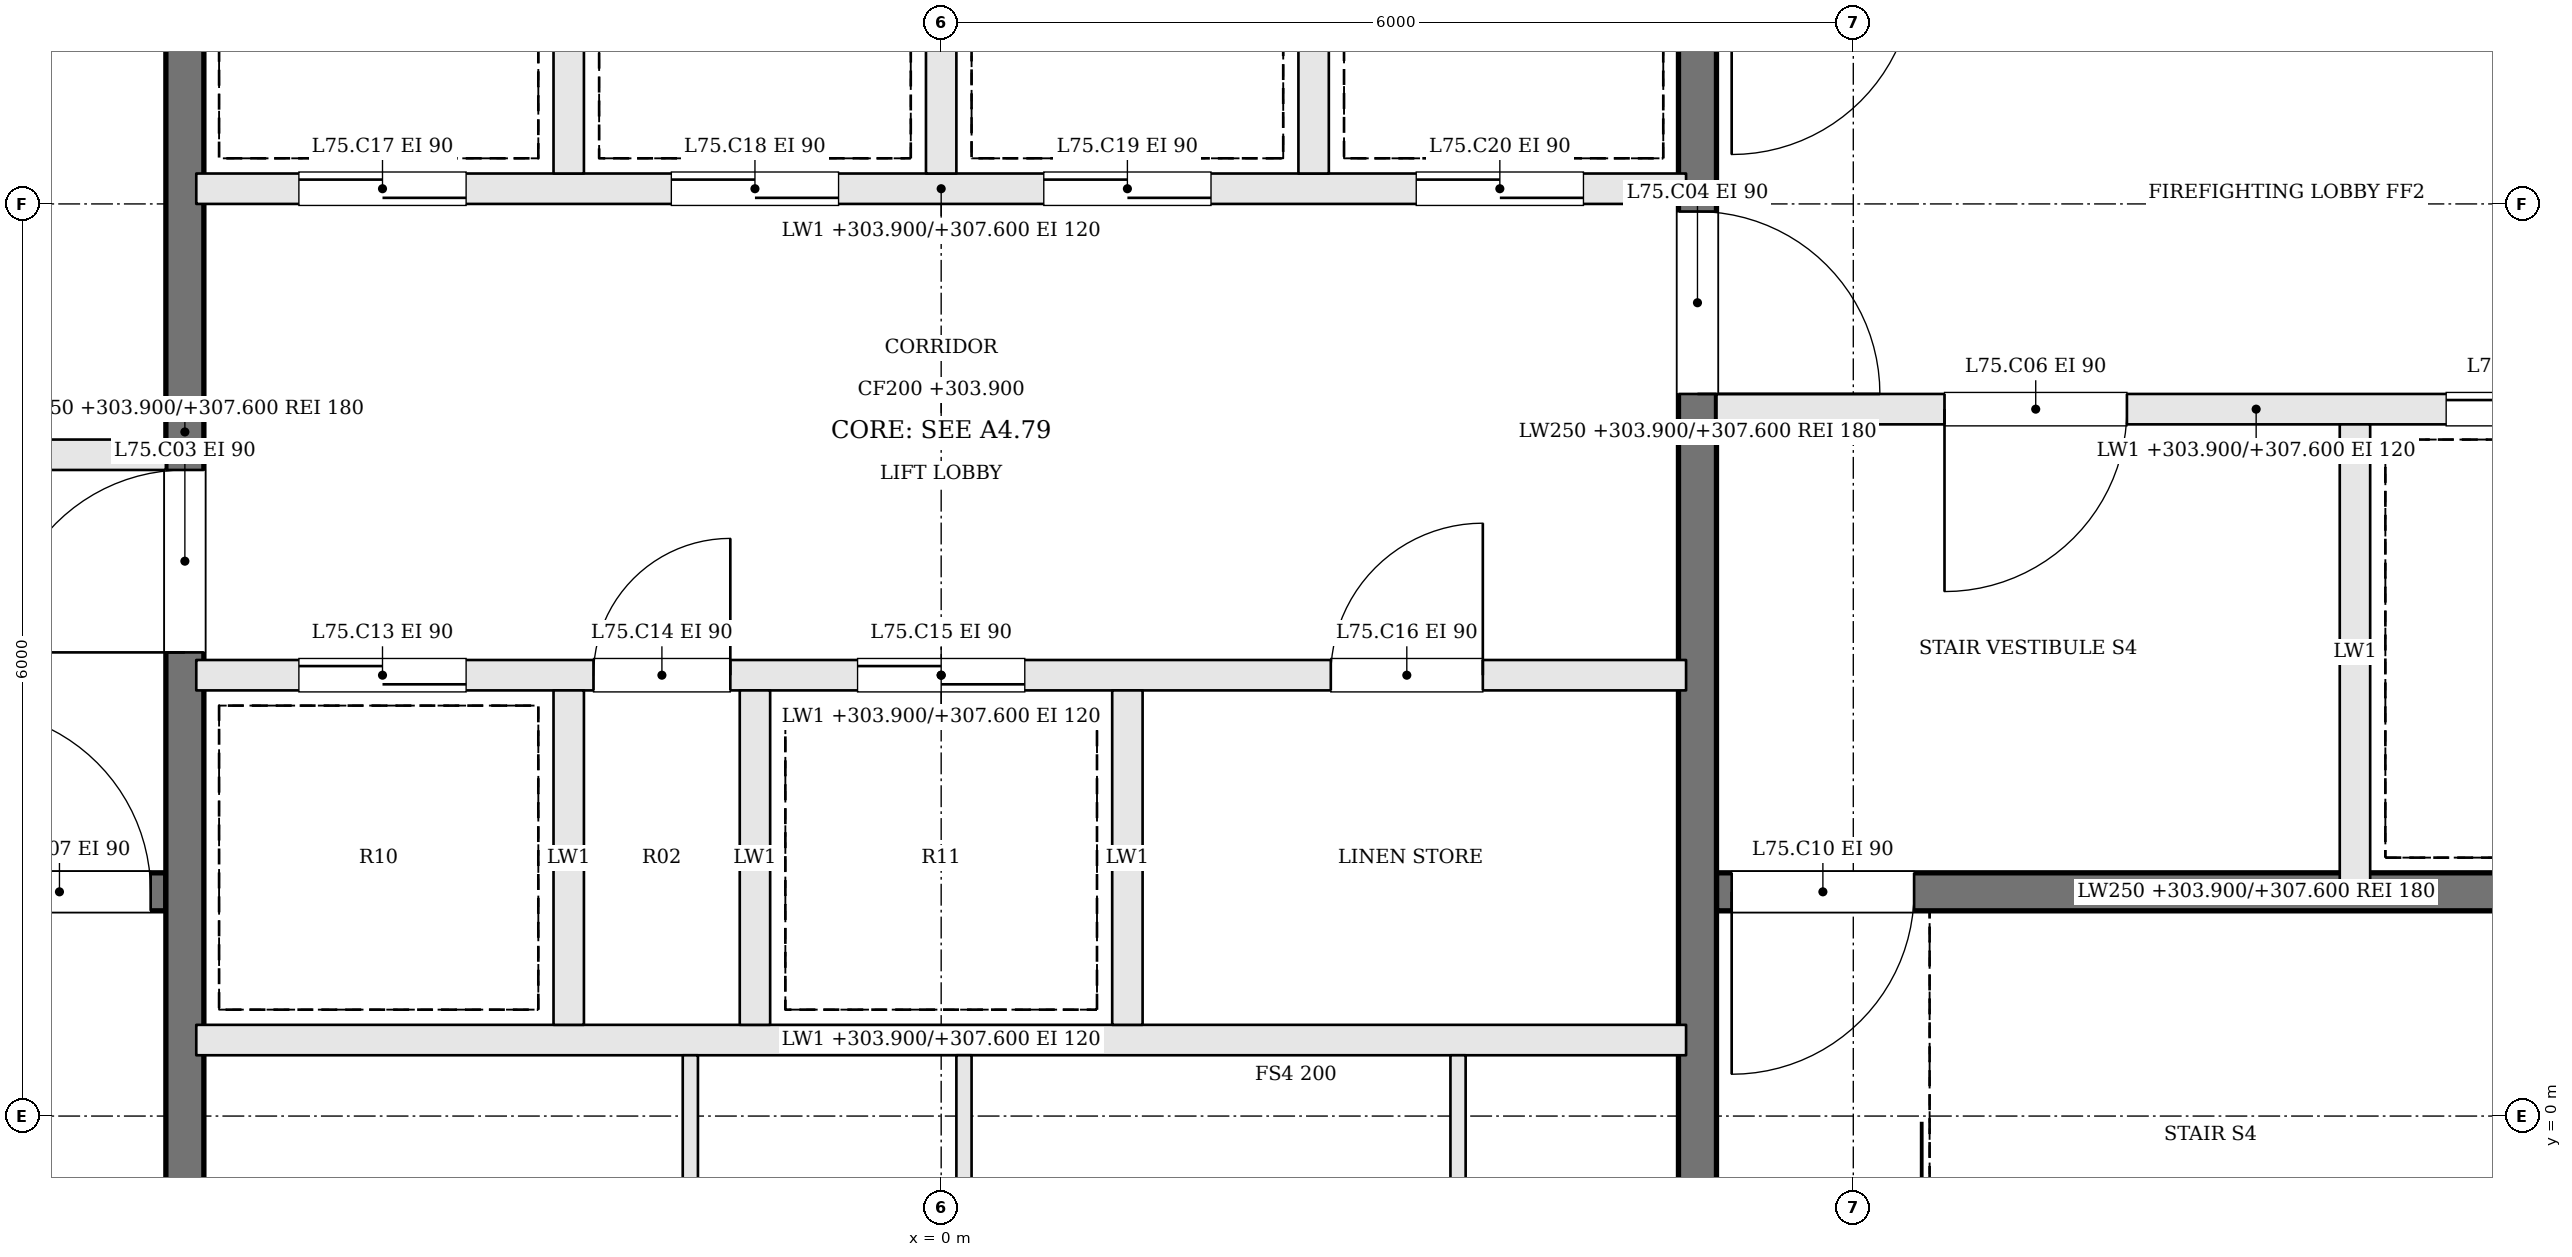
"""IFC4 building model, lengths in metres.
Left out: names, types, materials, properties, quantities, classifications, styles, units other than length and angle.
Written with IfcOpenShell. Run it as: python <this file> out.ifc"""

import sys

from ifc_helpers import new_model, si_unit, direction, frame, frame_2d, origin, place, context, subcontext, project, spatial, rectangle, extrude, element, fill, save


model = new_model("IFC4")
c1 = context("Model", 3, precision=1e-05, world=origin(), true_north=direction((0.0, 1.0)))
c2 = subcontext(c1, "Body", "Model", "MODEL_VIEW")
j1 = project(units=[si_unit("LENGTHUNIT", "METRE"), si_unit("PLANEANGLEUNIT", "RADIAN")], contexts=[c1])
p1 = place(None, origin())
s1 = spatial("IfcSite", under=j1, at=p1, CompositionType="ELEMENT")
p2 = place(p1, origin())
s2 = spatial("IfcBuilding", under=s1, at=p2, CompositionType="ELEMENT")
p3 = place(p2, frame((0.0, 0.0, 303.9)))
s3 = spatial("IfcBuildingStorey", under=s2, at=p3, CompositionType="ELEMENT", Elevation=303.9)
p4 = place(p3, frame((-12.2, 1.475, 0.0), z_axis=(0.0, 0.0, 1.0), x_axis=(1.0, 0.0, 0.0)))
e1 = element("IfcWall", 1, at=p4, inside=s3, PredefinedType="SOLIDWALL", context=c2, shape_type="SweptSolid", body=[
    extrude(rectangle(XDim=7.1, YDim=0.25, at=frame_2d((3.55, 0.0))), origin(), (0.0, 0.0, 1.0), 3.7),
])
p5 = place(p4, frame((5.8, 0.0, 0.0)))
e2 = element("IfcOpeningElement", 2, at=p5, cuts=e1, PredefinedType="OPENING", context=c2, shape_type="SweptSolid", body=[
    extrude(rectangle(XDim=1.2, YDim=2.1, at=frame_2d((0.6, 1.05))), frame((0.0, 0.135, 0.0), z_axis=(0.0, -1.0, 0.0), x_axis=(1.0, 0.0, 0.0)), (0.0, 0.0, 1.0), 0.27),
])
p6 = place(p3, frame((-12.2, 4.35, 0.0), z_axis=(0.0, 0.0, 1.0), x_axis=(1.0, 0.0, 0.0)))
e3 = element("IfcWall", 3, at=p6, inside=s3, PredefinedType="SOLIDWALL", context=c2, shape_type="SweptSolid", body=[
    extrude(rectangle(XDim=7.1, YDim=0.2, at=frame_2d((3.55, 0.0))), origin(), (0.0, 0.0, 1.0), 3.7),
])
p7 = place(p6, frame((4.4, 0.0, 0.0)))
e4 = element("IfcOpeningElement", 4, at=p7, cuts=e3, PredefinedType="OPENING", context=c2, shape_type="SweptSolid", body=[
    extrude(rectangle(XDim=1.2, YDim=2.1, at=frame_2d((0.6, 1.05))), frame((0.0, 0.11, 0.0), z_axis=(0.0, -1.0, 0.0), x_axis=(1.0, 0.0, 0.0)), (0.0, 0.0, 1.0), 0.22),
])
p8 = place(p6, frame((1.1, 0.0, 0.0)))
e5 = element("IfcOpeningElement", 5, at=p8, cuts=e3, PredefinedType="OPENING", context=c2, shape_type="SweptSolid", body=[
    extrude(rectangle(XDim=1.2, YDim=2.1, at=frame_2d((0.6, 1.05))), frame((0.0, 0.11, 0.0), z_axis=(0.0, -1.0, 0.0), x_axis=(1.0, 0.0, 0.0)), (0.0, 0.0, 1.0), 0.22),
])
p9 = place(p3, frame((12.2, 4.65, 0.0), z_axis=(0.0, 0.0, 1.0), x_axis=(-1.0, 0.0, 0.0)))
e6 = element("IfcWall", 6, at=p9, inside=s3, PredefinedType="SOLIDWALL", context=c2, shape_type="SweptSolid", body=[
    extrude(rectangle(XDim=7.1, YDim=0.2, at=frame_2d((3.55, 0.0))), origin(), (0.0, 0.0, 1.0), 3.7),
])
p10 = place(p9, frame((4.4, 0.0, 0.0)))
e7 = element("IfcOpeningElement", 7, at=p10, cuts=e6, PredefinedType="OPENING", context=c2, shape_type="SweptSolid", body=[
    extrude(rectangle(XDim=1.2, YDim=2.1, at=frame_2d((0.6, 1.05))), frame((0.0, 0.11, 0.0), z_axis=(0.0, -1.0, 0.0), x_axis=(1.0, 0.0, 0.0)), (0.0, 0.0, 1.0), 0.22),
])
p11 = place(p9, frame((1.1, 0.0, 0.0)))
e8 = element("IfcOpeningElement", 8, at=p11, cuts=e6, PredefinedType="OPENING", context=c2, shape_type="SweptSolid", body=[
    extrude(rectangle(XDim=1.2, YDim=2.1, at=frame_2d((0.6, 1.05))), frame((0.0, 0.11, 0.0), z_axis=(0.0, -1.0, 0.0), x_axis=(1.0, 0.0, 0.0)), (0.0, 0.0, 1.0), 0.22),
])
p12 = place(p3, frame((12.2, 1.475, 0.0), z_axis=(0.0, 0.0, 1.0), x_axis=(-1.0, 0.0, 0.0)))
e9 = element("IfcWall", 9, at=p12, inside=s3, PredefinedType="SOLIDWALL", context=c2, shape_type="SweptSolid", body=[
    extrude(rectangle(XDim=7.1, YDim=0.25, at=frame_2d((3.55, 0.0))), origin(), (0.0, 0.0, 1.0), 3.7),
])
p13 = place(p12, frame((5.8, 0.0, 0.0)))
e10 = element("IfcOpeningElement", 10, at=p13, cuts=e9, PredefinedType="OPENING", context=c2, shape_type="SweptSolid", body=[
    extrude(rectangle(XDim=1.2, YDim=2.1, at=frame_2d((0.6, 1.05))), frame((0.0, 0.135, 0.0), z_axis=(0.0, -1.0, 0.0), x_axis=(1.0, 0.0, 0.0)), (0.0, 0.0, 1.0), 0.27),
])
p14 = place(p3, frame((9.3, 4.55, 0.0), z_axis=(0.0, 0.0, 1.0), x_axis=(0.0, -1.0, 0.0)))
e11 = element("IfcWall", 11, at=p14, inside=s3, PredefinedType="SOLIDWALL", context=c2, shape_type="SweptSolid", body=[
    extrude(rectangle(XDim=3.0, YDim=0.2, at=frame_2d((1.5, 0.0))), origin(), (0.0, 0.0, 1.0), 3.7),
])
p15 = place(p3, frame((-4.975, -2.2, 0.0), z_axis=(0.0, 0.0, 1.0), x_axis=(0.0, 1.0, 0.0)))
e12 = element("IfcWall", 12, at=p15, inside=s3, PredefinedType="SOLIDWALL", context=c2, shape_type="SweptSolid", body=[
    extrude(rectangle(XDim=13.4, YDim=0.25, at=frame_2d((6.7, 0.0))), origin(), (0.0, 0.0, 1.0), 3.7),
])
p16 = place(p15, frame((5.25, 0.0, 0.0)))
e13 = element("IfcOpeningElement", 13, at=p16, cuts=e12, PredefinedType="OPENING", context=c2, shape_type="SweptSolid", body=[
    extrude(rectangle(XDim=1.2, YDim=2.1, at=frame_2d((0.6, 1.05))), frame((0.0, 0.135, 0.0), z_axis=(0.0, -1.0, 0.0), x_axis=(1.0, 0.0, 0.0)), (0.0, 0.0, 1.0), 0.27),
])
p17 = place(p3, frame((4.975, 11.2, 0.0), z_axis=(0.0, 0.0, 1.0), x_axis=(0.0, -1.0, 0.0)))
e14 = element("IfcWall", 14, at=p17, inside=s3, PredefinedType="SOLIDWALL", context=c2, shape_type="SweptSolid", body=[
    extrude(rectangle(XDim=13.4, YDim=0.25, at=frame_2d((6.7, 0.0))), origin(), (0.0, 0.0, 1.0), 3.7),
])
p18 = place(p17, frame((5.25, 0.0, 0.0)))
e15 = element("IfcOpeningElement", 15, at=p18, cuts=e14, PredefinedType="OPENING", context=c2, shape_type="SweptSolid", body=[
    extrude(rectangle(XDim=1.2, YDim=2.1, at=frame_2d((0.6, 1.05))), frame((0.0, 0.135, 0.0), z_axis=(0.0, -1.0, 0.0), x_axis=(1.0, 0.0, 0.0)), (0.0, 0.0, 1.0), 0.27),
])
p19 = place(p3, frame((-4.9, 0.5, 0.0), z_axis=(0.0, 0.0, 1.0), x_axis=(1.0, 0.0, 0.0)))
e16 = element("IfcWall", 16, at=p19, inside=s3, PredefinedType="SOLIDWALL", context=c2, shape_type="SweptSolid", body=[
    extrude(rectangle(XDim=9.8, YDim=0.2, at=frame_2d((4.9, 0.0))), origin(), (0.0, 0.0, 1.0), 3.7),
])
p20 = place(p3, frame((-4.9, 2.9, 0.0), z_axis=(0.0, 0.0, 1.0), x_axis=(1.0, 0.0, 0.0)))
e17 = element("IfcWall", 17, at=p20, inside=s3, PredefinedType="SOLIDWALL", context=c2, shape_type="SweptSolid", body=[
    extrude(rectangle(XDim=9.8, YDim=0.2, at=frame_2d((4.9, 0.0))), origin(), (0.0, 0.0, 1.0), 3.7),
])
p21 = place(p20, frame((0.675, 0.0, 0.0)))
e18 = element("IfcOpeningElement", 18, at=p21, cuts=e17, PredefinedType="OPENING", context=c2, shape_type="SweptSolid", body=[
    extrude(rectangle(XDim=1.1, YDim=2.1, at=frame_2d((0.55, 1.05))), frame((0.0, 0.11, 0.0), z_axis=(0.0, -1.0, 0.0), x_axis=(1.0, 0.0, 0.0)), (0.0, 0.0, 1.0), 0.22),
])
p22 = place(p20, frame((2.613, 0.0, 0.0)))
e19 = element("IfcOpeningElement", 19, at=p22, cuts=e17, PredefinedType="OPENING", context=c2, shape_type="SweptSolid", body=[
    extrude(rectangle(XDim=0.9, YDim=2.1, at=frame_2d((0.45, 1.05))), frame((0.0, 0.11, 0.0), z_axis=(0.0, -1.0, 0.0), x_axis=(1.0, 0.0, 0.0)), (0.0, 0.0, 1.0), 0.22),
])
p23 = place(p20, frame((4.35, 0.0, 0.0)))
e20 = element("IfcOpeningElement", 20, at=p23, cuts=e17, PredefinedType="OPENING", context=c2, shape_type="SweptSolid", body=[
    extrude(rectangle(XDim=1.1, YDim=2.1, at=frame_2d((0.55, 1.05))), frame((0.0, 0.11, 0.0), z_axis=(0.0, -1.0, 0.0), x_axis=(1.0, 0.0, 0.0)), (0.0, 0.0, 1.0), 0.22),
])
p24 = place(p20, frame((7.463, 0.0, 0.0)))
e21 = element("IfcOpeningElement", 21, at=p24, cuts=e17, PredefinedType="OPENING", context=c2, shape_type="SweptSolid", body=[
    extrude(rectangle(XDim=1.0, YDim=2.1, at=frame_2d((0.5, 1.05))), frame((0.0, 0.11, 0.0), z_axis=(0.0, -1.0, 0.0), x_axis=(1.0, 0.0, 0.0)), (0.0, 0.0, 1.0), 0.22),
])
p25 = place(p3, frame((-4.9, 6.1, 0.0), z_axis=(0.0, 0.0, 1.0), x_axis=(1.0, 0.0, 0.0)))
e22 = element("IfcWall", 22, at=p25, inside=s3, PredefinedType="SOLIDWALL", context=c2, shape_type="SweptSolid", body=[
    extrude(rectangle(XDim=9.8, YDim=0.2, at=frame_2d((4.9, 0.0))), origin(), (0.0, 0.0, 1.0), 3.7),
])
p26 = place(p25, frame((0.675, 0.0, 0.0)))
e23 = element("IfcOpeningElement", 23, at=p26, cuts=e22, PredefinedType="OPENING", context=c2, shape_type="SweptSolid", body=[
    extrude(rectangle(XDim=1.1, YDim=2.1, at=frame_2d((0.55, 1.05))), frame((0.0, 0.11, 0.0), z_axis=(0.0, -1.0, 0.0), x_axis=(1.0, 0.0, 0.0)), (0.0, 0.0, 1.0), 0.22),
])
p27 = place(p25, frame((3.125, 0.0, 0.0)))
e24 = element("IfcOpeningElement", 24, at=p27, cuts=e22, PredefinedType="OPENING", context=c2, shape_type="SweptSolid", body=[
    extrude(rectangle(XDim=1.1, YDim=2.1, at=frame_2d((0.55, 1.05))), frame((0.0, 0.11, 0.0), z_axis=(0.0, -1.0, 0.0), x_axis=(1.0, 0.0, 0.0)), (0.0, 0.0, 1.0), 0.22),
])
p28 = place(p25, frame((5.575, 0.0, 0.0)))
e25 = element("IfcOpeningElement", 25, at=p28, cuts=e22, PredefinedType="OPENING", context=c2, shape_type="SweptSolid", body=[
    extrude(rectangle(XDim=1.1, YDim=2.1, at=frame_2d((0.55, 1.05))), frame((0.0, 0.11, 0.0), z_axis=(0.0, -1.0, 0.0), x_axis=(1.0, 0.0, 0.0)), (0.0, 0.0, 1.0), 0.22),
])
p29 = place(p25, frame((8.025, 0.0, 0.0)))
e26 = element("IfcOpeningElement", 26, at=p29, cuts=e22, PredefinedType="OPENING", context=c2, shape_type="SweptSolid", body=[
    extrude(rectangle(XDim=1.1, YDim=2.1, at=frame_2d((0.55, 1.05))), frame((0.0, 0.11, 0.0), z_axis=(0.0, -1.0, 0.0), x_axis=(1.0, 0.0, 0.0)), (0.0, 0.0, 1.0), 0.22),
])
for number, where, z_axis, x_axis in (
    (27, (-2.45, 0.6, 0.0), (0.0, 0.0, 1.0), (0.0, 1.0, 0.0)),
    (28, (-1.225, 0.6, 0.0), (0.0, 0.0, 1.0), (0.0, 1.0, 0.0)),
    (29, (1.225, 0.6, 0.0), (0.0, 0.0, 1.0), (0.0, 1.0, 0.0)),
    (30, (-2.45, 6.2, 0.0), (0.0, 0.0, 1.0), (0.0, 1.0, 0.0)),
    (31, (0.0, 6.2, 0.0), (0.0, 0.0, 1.0), (0.0, 1.0, 0.0)),
    (32, (2.45, 6.2, 0.0), (0.0, 0.0, 1.0), (0.0, 1.0, 0.0)),
):
    element("IfcWall", number, at=place(p3, frame(where, z_axis=z_axis, x_axis=x_axis)), inside=s3, PredefinedType="SOLIDWALL", context=c2, shape_type="SweptSolid", body=[
        extrude(rectangle(XDim=2.2, YDim=0.2, at=frame_2d((1.1, 0.0))), origin(), (0.0, 0.0, 1.0), 3.7),
    ])
for number, where, z_axis, x_axis in (
    (33, (-1.65, -2.2, 0.0), (0.0, 0.0, 1.0), (0.0, 1.0, 0.0)),
    (34, (0.15, -2.2, 0.0), (0.0, 0.0, 1.0), (0.0, 1.0, 0.0)),
    (35, (3.4, -2.2, 0.0), (0.0, 0.0, 1.0), (0.0, 1.0, 0.0)),
):
    element("IfcWall", number, at=place(p3, frame(where, z_axis=z_axis, x_axis=x_axis)), inside=s3, PredefinedType="PARTITIONING", context=c2, shape_type="SweptSolid", body=[
        extrude(rectangle(XDim=2.6, YDim=0.1, at=frame_2d((1.3, 0.0))), origin(), (0.0, 0.0, 1.0), 3.7),
    ])
p30 = place(p16, origin())
e36 = element("IfcDoor", 36, at=p30, inside=s3, OperationType="SINGLE_SWING_LEFT", PredefinedType="DOOR", context=c2, shape_type="SweptSolid", body=[
    extrude(rectangle(XDim=1.2, YDim=2.1, at=frame_2d((0.6, 1.05))), frame((0.0, 0.025, 0.0), z_axis=(0.0, -1.0, 0.0), x_axis=(1.0, 0.0, 0.0)), (0.0, 0.0, 1.0), 0.05),
])
fill(e13, e36)
p31 = place(p18, origin())
e37 = element("IfcDoor", 37, at=p31, inside=s3, OperationType="SINGLE_SWING_RIGHT", PredefinedType="DOOR", context=c2, shape_type="SweptSolid", body=[
    extrude(rectangle(XDim=1.2, YDim=2.1, at=frame_2d((0.6, 1.05))), frame((0.0, 0.025, 0.0), z_axis=(0.0, -1.0, 0.0), x_axis=(1.0, 0.0, 0.0)), (0.0, 0.0, 1.0), 0.05),
])
fill(e15, e37)
p32 = place(p10, origin())
e38 = element("IfcDoor", 38, at=p32, inside=s3, OperationType="SINGLE_SWING_RIGHT", PredefinedType="DOOR", context=c2, shape_type="SweptSolid", body=[
    extrude(rectangle(XDim=1.2, YDim=2.1, at=frame_2d((0.6, 1.05))), frame((0.0, 0.025, 0.0), z_axis=(0.0, -1.0, 0.0), x_axis=(1.0, 0.0, 0.0)), (0.0, 0.0, 1.0), 0.05),
])
fill(e7, e38)
p33 = place(p5, origin())
e39 = element("IfcDoor", 39, at=p33, inside=s3, OperationType="SINGLE_SWING_LEFT", PredefinedType="DOOR", context=c2, shape_type="SweptSolid", body=[
    extrude(rectangle(XDim=1.2, YDim=2.1, at=frame_2d((0.6, 1.05))), frame((0.0, 0.025, 0.0), z_axis=(0.0, -1.0, 0.0), x_axis=(1.0, 0.0, 0.0)), (0.0, 0.0, 1.0), 0.05),
])
fill(e2, e39)
p34 = place(p13, origin())
e40 = element("IfcDoor", 40, at=p34, inside=s3, OperationType="SINGLE_SWING_RIGHT", PredefinedType="DOOR", context=c2, shape_type="SweptSolid", body=[
    extrude(rectangle(XDim=1.2, YDim=2.1, at=frame_2d((0.6, 1.05))), frame((0.0, 0.025, 0.0), z_axis=(0.0, -1.0, 0.0), x_axis=(1.0, 0.0, 0.0)), (0.0, 0.0, 1.0), 0.05),
])
fill(e10, e40)
p35 = place(p11, origin())
e41 = element("IfcDoor", 41, at=p35, inside=s3, OperationType="SLIDING_TO_RIGHT", PredefinedType="DOOR", context=c2, shape_type="SweptSolid", body=[
    extrude(rectangle(XDim=1.2, YDim=2.1, at=frame_2d((0.6, 1.05))), frame((0.0, 0.025, 0.0), z_axis=(0.0, -1.0, 0.0), x_axis=(1.0, 0.0, 0.0)), (0.0, 0.0, 1.0), 0.05),
])
fill(e8, e41)
p36 = place(p21, origin())
e42 = element("IfcDoor", 42, at=p36, inside=s3, OperationType="SLIDING_TO_RIGHT", PredefinedType="DOOR", context=c2, shape_type="SweptSolid", body=[
    extrude(rectangle(XDim=1.1, YDim=2.1, at=frame_2d((0.55, 1.05))), frame((0.0, 0.025, 0.0), z_axis=(0.0, -1.0, 0.0), x_axis=(1.0, 0.0, 0.0)), (0.0, 0.0, 1.0), 0.05),
])
fill(e18, e42)
p37 = place(p22, origin())
e43 = element("IfcDoor", 43, at=p37, inside=s3, OperationType="SINGLE_SWING_RIGHT", PredefinedType="DOOR", context=c2, shape_type="SweptSolid", body=[
    extrude(rectangle(XDim=0.9, YDim=2.1, at=frame_2d((0.45, 1.05))), frame((0.0, 0.025, 0.0), z_axis=(0.0, -1.0, 0.0), x_axis=(1.0, 0.0, 0.0)), (0.0, 0.0, 1.0), 0.05),
])
fill(e19, e43)
p38 = place(p23, origin())
e44 = element("IfcDoor", 44, at=p38, inside=s3, OperationType="SLIDING_TO_LEFT", PredefinedType="DOOR", context=c2, shape_type="SweptSolid", body=[
    extrude(rectangle(XDim=1.1, YDim=2.1, at=frame_2d((0.55, 1.05))), frame((0.0, 0.025, 0.0), z_axis=(0.0, -1.0, 0.0), x_axis=(1.0, 0.0, 0.0)), (0.0, 0.0, 1.0), 0.05),
])
fill(e20, e44)
p39 = place(p24, origin())
e45 = element("IfcDoor", 45, at=p39, inside=s3, OperationType="SINGLE_SWING_RIGHT", PredefinedType="DOOR", context=c2, shape_type="SweptSolid", body=[
    extrude(rectangle(XDim=1.0, YDim=2.1, at=frame_2d((0.5, 1.05))), frame((0.0, 0.025, 0.0), z_axis=(0.0, -1.0, 0.0), x_axis=(1.0, 0.0, 0.0)), (0.0, 0.0, 1.0), 0.05),
])
fill(e21, e45)
p40 = place(p26, origin())
e46 = element("IfcDoor", 46, at=p40, inside=s3, OperationType="SLIDING_TO_RIGHT", PredefinedType="DOOR", context=c2, shape_type="SweptSolid", body=[
    extrude(rectangle(XDim=1.1, YDim=2.1, at=frame_2d((0.55, 1.05))), frame((0.0, 0.025, 0.0), z_axis=(0.0, -1.0, 0.0), x_axis=(1.0, 0.0, 0.0)), (0.0, 0.0, 1.0), 0.05),
])
fill(e23, e46)
p41 = place(p27, origin())
e47 = element("IfcDoor", 47, at=p41, inside=s3, OperationType="SLIDING_TO_LEFT", PredefinedType="DOOR", context=c2, shape_type="SweptSolid", body=[
    extrude(rectangle(XDim=1.1, YDim=2.1, at=frame_2d((0.55, 1.05))), frame((0.0, 0.025, 0.0), z_axis=(0.0, -1.0, 0.0), x_axis=(1.0, 0.0, 0.0)), (0.0, 0.0, 1.0), 0.05),
])
fill(e24, e47)
p42 = place(p28, origin())
e48 = element("IfcDoor", 48, at=p42, inside=s3, OperationType="SLIDING_TO_RIGHT", PredefinedType="DOOR", context=c2, shape_type="SweptSolid", body=[
    extrude(rectangle(XDim=1.1, YDim=2.1, at=frame_2d((0.55, 1.05))), frame((0.0, 0.025, 0.0), z_axis=(0.0, -1.0, 0.0), x_axis=(1.0, 0.0, 0.0)), (0.0, 0.0, 1.0), 0.05),
])
fill(e25, e48)
p43 = place(p29, origin())
e49 = element("IfcDoor", 49, at=p43, inside=s3, OperationType="SLIDING_TO_LEFT", PredefinedType="DOOR", context=c2, shape_type="SweptSolid", body=[
    extrude(rectangle(XDim=1.1, YDim=2.1, at=frame_2d((0.55, 1.05))), frame((0.0, 0.025, 0.0), z_axis=(0.0, -1.0, 0.0), x_axis=(1.0, 0.0, 0.0)), (0.0, 0.0, 1.0), 0.05),
])
fill(e26, e49)
save(model, sys.argv[1])
